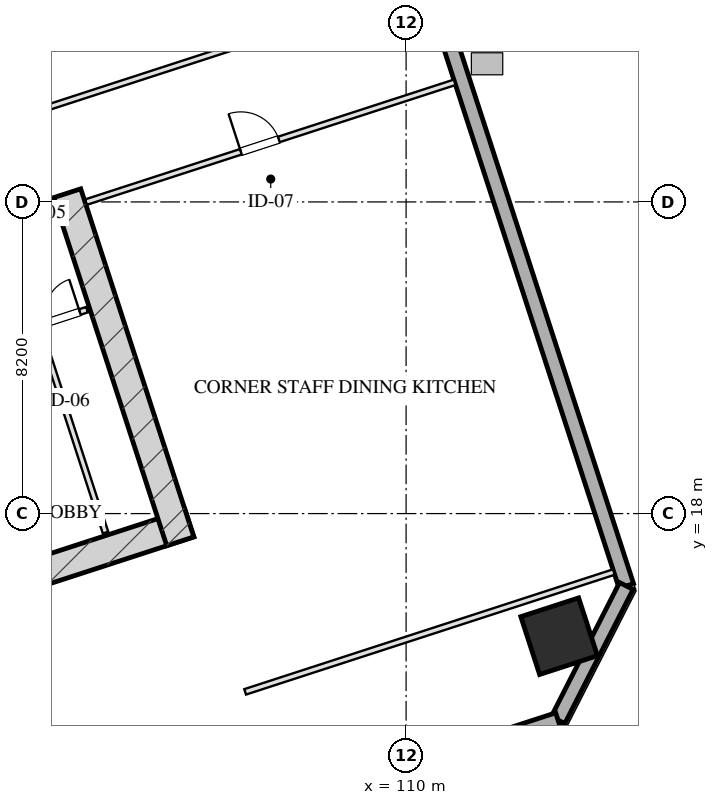
"""IFC4 building model, lengths in metres.
Left out: names, types, materials, properties, quantities, classifications, styles, units other than length and angle.
Written with IfcOpenShell. Run it as: python <this file> out.ifc"""

import sys

from ifc_helpers import new_model, si_unit, direction, frame, frame_2d, origin, origin_2d, place, context, subcontext, project, spatial, rectangle, hollow_rectangle, extrude, element, fill, save


model = new_model("IFC4")
c1 = context("Model", 3, precision=1e-05, world=origin(), true_north=direction((0.0, 1.0)))
c2 = subcontext(c1, "Body", "Model", "MODEL_VIEW")
j1 = project(units=[si_unit("LENGTHUNIT", "METRE"), si_unit("PLANEANGLEUNIT", "RADIAN")], contexts=[c1])
p1 = place(None, origin())
s1 = spatial("IfcSite", under=j1, at=p1, CompositionType="ELEMENT")
p2 = place(p1, origin())
s2 = spatial("IfcBuilding", under=s1, at=p2, CompositionType="ELEMENT")
p3 = place(p2, frame((0.0, 0.0, 67.85)))
s3 = spatial("IfcBuildingStorey", under=s2, at=p3, CompositionType="ELEMENT", Elevation=67.85)
p4 = place(p3, frame((88.559, 12.629, 0.0), z_axis=(0.0, 0.0, 1.0), x_axis=(0.951056072937, 0.309018358888, 0.0)))
e1 = element("IfcWall", 1, at=p4, inside=s3, PredefinedType="SHEAR", context=c2, shape_type="SweptSolid", body=[
    extrude(rectangle(XDim=16.55, YDim=0.75, at=frame_2d((8.275, 0.0))), origin(), (0.0, 0.0, 1.0), 3.45),
])
p5 = place(p3, frame((101.082, 26.429, 0.0), z_axis=(0.0, 0.0, 1.0), x_axis=(0.309016134813, -0.951056795583, 0.0)))
e2 = element("IfcWall", 2, at=p5, inside=s3, PredefinedType="SHEAR", context=c2, shape_type="SweptSolid", body=[
    extrude(rectangle(XDim=9.63, YDim=0.75, at=frame_2d((4.815, 0.0))), origin(), (0.0, 0.0, 1.0), 3.45),
])
p6 = place(p3, frame((114.027, 14.774, 0.0), z_axis=(0.0, 0.0, 1.0), x_axis=(0.951056516295, 0.309016994375, 0.0)))
e3 = element("IfcColumn", 3, at=p6, inside=s3, PredefinedType="COLUMN", context=c2, shape_type="SweptSolid", body=[
    extrude(hollow_rectangle(XDim=1.6, YDim=1.6, WallThickness=0.055, at=origin_2d()), origin(), (0.0, 0.0, 1.0), 3.451),
])
p7 = place(p3, frame((100.345, 63.648, 0.0), z_axis=(0.0, 0.0, 1.0), x_axis=(0.309014526607, -0.951057318118, 0.0)))
e4 = element("IfcWall", 4, at=p7, inside=s3, PredefinedType="SOLIDWALL", context=c2, shape_type="SweptSolid", body=[
    extrude(rectangle(XDim=50.0, YDim=0.4, at=frame_2d((25.0, 0.0))), origin(), (0.0, 0.0, 1.0), 2.61),
])
p8 = place(p7, frame((21.15, 0.0, 0.75)))
e5 = element("IfcOpeningElement", 5, at=p8, cuts=e4, PredefinedType="OPENING", context=c2, shape_type="SweptSolid", body=[
    extrude(rectangle(XDim=2.5, YDim=1.46, at=frame_2d((1.25, 0.73))), frame((0.0, 0.21, 0.0), z_axis=(0.0, -1.0, 0.0), x_axis=(1.0, 0.0, 0.0)), (0.0, 0.0, 1.0), 0.42),
])
p9 = place(p7, frame((17.35, 0.0, 0.75)))
e6 = element("IfcOpeningElement", 6, at=p9, cuts=e4, PredefinedType="OPENING", context=c2, shape_type="SweptSolid", body=[
    extrude(rectangle(XDim=2.5, YDim=1.46, at=frame_2d((1.25, 0.73))), frame((0.0, 0.21, 0.0), z_axis=(0.0, -1.0, 0.0), x_axis=(1.0, 0.0, 0.0)), (0.0, 0.0, 1.0), 0.42),
])
p10 = place(p7, frame((30.255, 0.0, 0.0)))
e7 = element("IfcOpeningElement", 7, at=p10, cuts=e4, PredefinedType="OPENING", context=c2, shape_type="SweptSolid", body=[
    extrude(rectangle(XDim=1.1, YDim=2.15, at=frame_2d((0.55, 1.075))), frame((0.0, 0.21, 0.0), z_axis=(0.0, -1.0, 0.0), x_axis=(1.0, 0.0, 0.0)), (0.0, 0.0, 1.0), 0.42),
])
p11 = place(p3, frame((115.795, 16.095, 0.0), z_axis=(0.0, 0.0, 1.0), x_axis=(-0.453958106755, -0.891023028497, 0.0)))
e8 = element("IfcWall", 8, at=p11, inside=s3, PredefinedType="SOLIDWALL", context=c2, shape_type="SweptSolid", body=[
    extrude(rectangle(XDim=3.96, YDim=0.4, at=frame_2d((1.98, 0.0))), origin(), (0.0, 0.0, 1.0), 2.61),
])
p12 = place(p3, frame((113.998, 12.567, 0.0), z_axis=(0.0, 0.0, 1.0), x_axis=(-0.951055939317, -0.309018770125, 0.0)))
e9 = element("IfcWall", 9, at=p12, inside=s3, PredefinedType="SOLIDWALL", context=c2, shape_type="SweptSolid", body=[
    extrude(rectangle(XDim=32.4, YDim=0.4, at=frame_2d((16.2, 0.0))), origin(), (0.0, 0.0, 1.0), 2.61),
])
p13 = place(p3, frame((97.727, 24.944, 0.0), z_axis=(0.0, 0.0, 1.0), x_axis=(0.951036872128, 0.309077446369, 0.0)))
e10 = element("IfcWall", 10, at=p13, inside=s3, PredefinedType="PARTITIONING", context=c2, shape_type="SweptSolid", body=[
    extrude(rectangle(XDim=3.2, YDim=0.15, at=frame_2d((1.6, 0.0))), origin(), (0.0, 0.0, 1.0), 3.175),
])
p14 = place(p13, frame((0.45, 0.0, 0.0)))
e11 = element("IfcOpeningElement", 11, at=p14, cuts=e10, PredefinedType="OPENING", context=c2, shape_type="SweptSolid", body=[
    extrude(rectangle(XDim=0.95, YDim=2.05, at=frame_2d((0.475, 1.025))), frame((0.0, 0.085, 0.0), z_axis=(0.0, -1.0, 0.0), x_axis=(1.0, 0.0, 0.0)), (0.0, 0.0, 1.0), 0.17),
])
p15 = place(p3, frame((98.561, 22.376, 0.0), z_axis=(0.0, 0.0, 1.0), x_axis=(0.95104415986, 0.309055020985, 0.0)))
e12 = element("IfcWall", 12, at=p15, inside=s3, PredefinedType="PARTITIONING", context=c2, shape_type="SweptSolid", body=[
    extrude(rectangle(XDim=3.2, YDim=0.15, at=frame_2d((1.6, 0.0))), origin(), (0.0, 0.0, 1.0), 3.175),
])
p16 = place(p15, frame((0.35, 0.0, 0.0)))
e13 = element("IfcOpeningElement", 13, at=p16, cuts=e12, PredefinedType="OPENING", context=c2, shape_type="SweptSolid", body=[
    extrude(rectangle(XDim=0.9, YDim=2.05, at=frame_2d((0.45, 1.025))), frame((0.0, 0.085, 0.0), z_axis=(0.0, -1.0, 0.0), x_axis=(1.0, 0.0, 0.0)), (0.0, 0.0, 1.0), 0.17),
])
p17 = place(p15, frame((2.1, 0.0, 0.0)))
e14 = element("IfcOpeningElement", 14, at=p17, cuts=e12, PredefinedType="OPENING", context=c2, shape_type="SweptSolid", body=[
    extrude(rectangle(XDim=0.9, YDim=2.05, at=frame_2d((0.45, 1.025))), frame((0.0, 0.085, 0.0), z_axis=(0.0, -1.0, 0.0), x_axis=(1.0, 0.0, 0.0)), (0.0, 0.0, 1.0), 0.17),
])
p18 = place(p3, frame((100.32, 22.948, 0.0), z_axis=(0.0, 0.0, 1.0), x_axis=(0.309035009867, -0.951050662518, 0.0)))
e15 = element("IfcWall", 15, at=p18, inside=s3, PredefinedType="PARTITIONING", context=c2, shape_type="SweptSolid", body=[
    extrude(rectangle(XDim=5.73, YDim=0.15, at=frame_2d((2.865, 0.0))), origin(), (0.0, 0.0, 1.0), 3.175),
])
p19 = place(p3, frame((105.765, 13.309, 0.0), z_axis=(0.0, 0.0, 1.0), x_axis=(0.951054294345, 0.309023832749, 0.0)))
e16 = element("IfcWall", 16, at=p19, inside=s3, PredefinedType="PARTITIONING", context=c2, shape_type="SweptSolid", body=[
    extrude(rectangle(XDim=10.2, YDim=0.15, at=frame_2d((5.1, 0.0))), origin(), (0.0, 0.0, 1.0), 3.175),
])
p20 = place(p3, frame((101.578, 26.196, 0.0), z_axis=(0.0, 0.0, 1.0), x_axis=(0.951059043131, 0.309009217467, 0.0)))
e17 = element("IfcWall", 17, at=p20, inside=s3, PredefinedType="PARTITIONING", context=c2, shape_type="SweptSolid", body=[
    extrude(rectangle(XDim=10.2, YDim=0.15, at=frame_2d((5.1, 0.0))), origin(), (0.0, 0.0, 1.0), 3.175),
])
p21 = place(p20, frame((4.284, 0.0, 0.0)))
e18 = element("IfcOpeningElement", 18, at=p21, cuts=e17, PredefinedType="OPENING", context=c2, shape_type="SweptSolid", body=[
    extrude(rectangle(XDim=1.05, YDim=2.05, at=frame_2d((0.525, 1.025))), frame((0.0, 0.085, 0.0), z_axis=(0.0, -1.0, 0.0), x_axis=(1.0, 0.0, 0.0)), (0.0, 0.0, 1.0), 0.17),
])
p22 = place(p3, frame((95.638, 27.084, 0.0), z_axis=(0.0, 0.0, 1.0), x_axis=(0.951055837847, 0.309019082414, 0.0)))
e19 = element("IfcWall", 19, at=p22, inside=s3, PredefinedType="PARTITIONING", context=c2, shape_type="SweptSolid", body=[
    extrude(rectangle(XDim=15.575, YDim=0.15, at=frame_2d((7.788, 0.0))), origin(), (0.0, 0.0, 1.0), 3.175),
])
p23 = place(p17, origin())
e20 = element("IfcDoor", 20, at=p23, inside=s3, OperationType="SINGLE_SWING_RIGHT", PredefinedType="DOOR", context=c2, shape_type="SweptSolid", body=[
    extrude(rectangle(XDim=0.9, YDim=2.05, at=frame_2d((0.45, 1.025))), frame((0.0, 0.025, 0.0), z_axis=(0.0, -1.0, 0.0), x_axis=(1.0, 0.0, 0.0)), (0.0, 0.0, 1.0), 0.05),
])
fill(e14, e20)
p24 = place(p21, origin())
e21 = element("IfcDoor", 21, at=p24, inside=s3, OperationType="SINGLE_SWING_LEFT", PredefinedType="DOOR", context=c2, shape_type="SweptSolid", body=[
    extrude(rectangle(XDim=1.05, YDim=2.05, at=frame_2d((0.525, 1.025))), frame((0.0, 0.025, 0.0), z_axis=(0.0, -1.0, 0.0), x_axis=(1.0, 0.0, 0.0)), (0.0, 0.0, 1.0), 0.05),
])
fill(e18, e21)
save(model, sys.argv[1])
